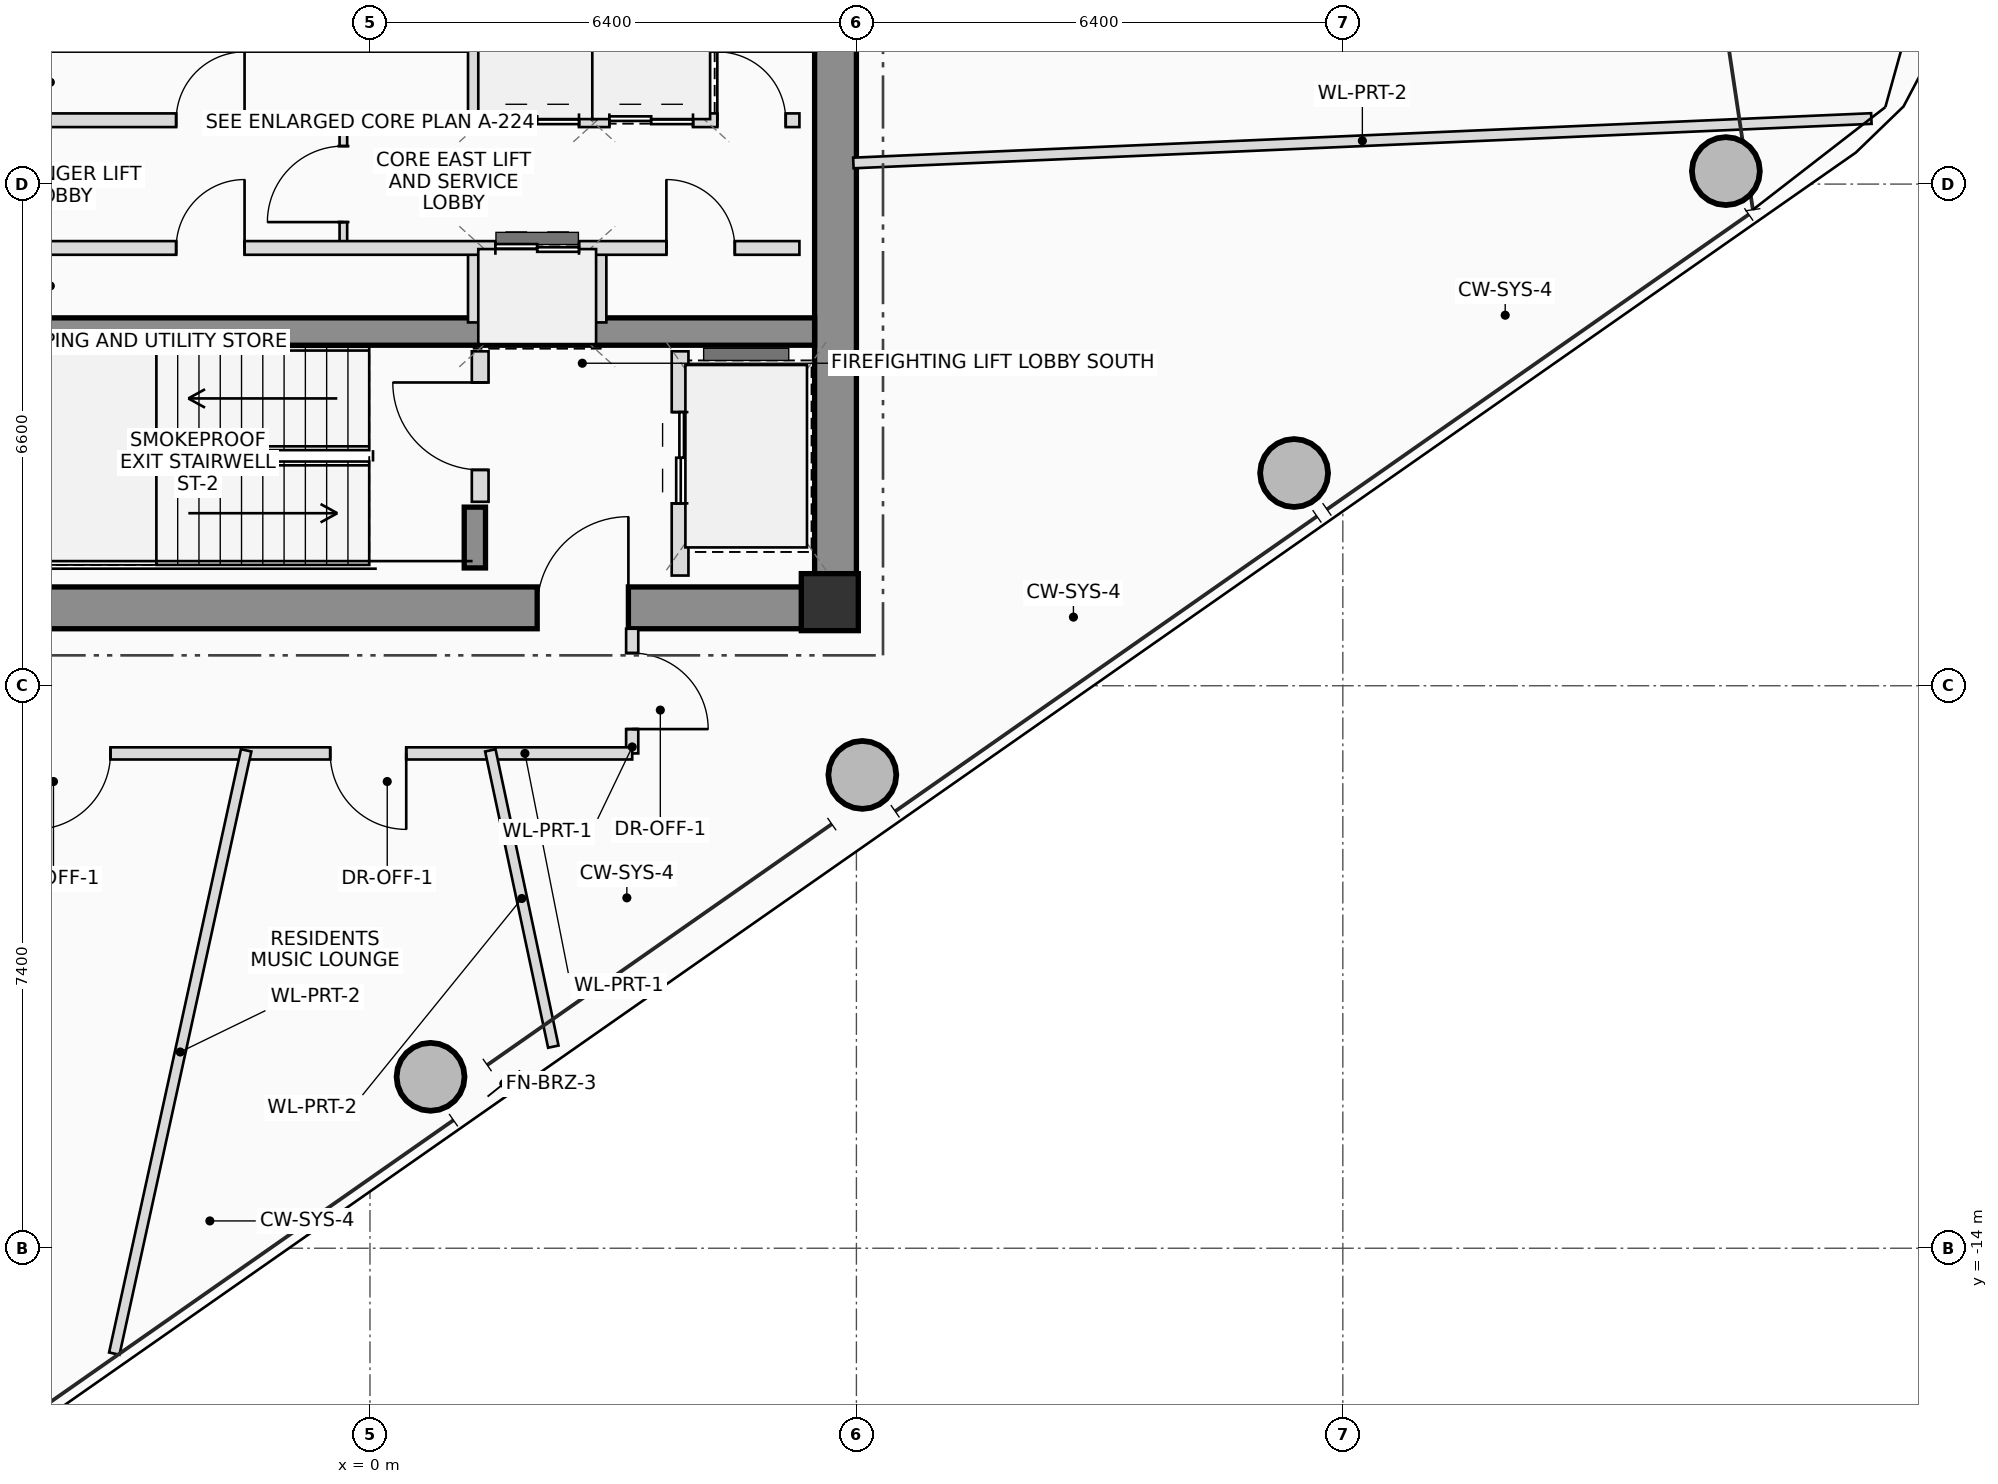
"""IFC4 building model, lengths in metres.
Left out: names, types, materials, properties, quantities, classifications, styles, units other than length and angle.
Written with IfcOpenShell. Run it as: python <this file> out.ifc"""

import sys

from ifc_helpers import new_model, si_unit, direction, frame, frame_2d, origin, origin_2d, place, context, subcontext, project, spatial, rectangle, hollow_circle, extrude, source, transform, mapped, element, fill, save


model = new_model("IFC4")
c1 = context("Model", 3, precision=1e-05, world=origin(), true_north=direction((0.0, 1.0)))
c2 = subcontext(c1, "Body", "Model", "MODEL_VIEW")
j1 = project(units=[si_unit("LENGTHUNIT", "METRE"), si_unit("PLANEANGLEUNIT", "RADIAN")], contexts=[c1])
p1 = place(None, origin())
s1 = spatial("IfcSite", under=j1, at=p1, CompositionType="ELEMENT")
p2 = place(p1, origin())
s2 = spatial("IfcBuilding", under=s1, at=p2, CompositionType="ELEMENT")
p3 = place(p2, frame((0.0, 0.0, 260.95)))
s3 = spatial("IfcBuildingStorey", under=s2, at=p3, CompositionType="ELEMENT", Elevation=260.95)
m1 = source(origin(), c2, "Body", "SweptSolid", [
    extrude(rectangle(XDim=0.75, YDim=0.75, at=origin_2d()), origin(), (0.0, 0.0, 1.0), 3.4),
])
p4 = place(p3, frame((6.05, -5.5, 0.0), z_axis=(0.0, 0.0, 1.0), x_axis=(1.0, 0.0, 0.0)))
e1 = element("IfcColumn", 1, at=p4, inside=s3, PredefinedType="COLUMN", context=c2, shape_type="MappedRepresentation", body=[
    mapped(m1, transform((0.0, 0.0, 0.0), scale=1.0)),
])
p5 = place(p3, frame((-6.4, -5.575, 0.0), z_axis=(0.0, 0.0, 1.0), x_axis=(1.0, 0.0, 0.0)))
e2 = element("IfcWall", 2, at=p5, inside=s3, PredefinedType="SHEAR", context=c2, shape_type="SweptSolid", body=[
    extrude(rectangle(XDim=12.8, YDim=0.55, at=frame_2d((6.4, 0.0))), origin(), (0.0, 0.0, 1.0), 3.4),
])
p6 = place(p5, frame((8.6, 0.0, 0.0)))
e3 = element("IfcOpeningElement", 3, at=p6, cuts=e2, PredefinedType="OPENING", context=c2, shape_type="SweptSolid", body=[
    extrude(rectangle(XDim=1.2, YDim=2.2, at=frame_2d((0.6, 1.1))), frame((0.0, 0.285, 0.0), z_axis=(0.0, -1.0, 0.0), x_axis=(1.0, 0.0, 0.0)), (0.0, 0.0, 1.0), 0.57),
])
p7 = place(p3, frame((6.125, -5.3, 0.0), z_axis=(0.0, 0.0, 1.0), x_axis=(0.0, 1.0, 0.0)))
e4 = element("IfcWall", 4, at=p7, inside=s3, PredefinedType="SHEAR", context=c2, shape_type="SweptSolid", body=[
    extrude(rectangle(XDim=10.6, YDim=0.55, at=frame_2d((5.3, 0.0))), origin(), (0.0, 0.0, 1.0), 3.4),
])
p8 = place(p3, frame((-5.85, -1.94, 0.0), z_axis=(0.0, 0.0, 1.0), x_axis=(1.0, 0.0, 0.0)))
e5 = element("IfcWall", 5, at=p8, inside=s3, PredefinedType="SHEAR", context=c2, shape_type="SweptSolid", body=[
    extrude(rectangle(XDim=11.7, YDim=0.36, at=frame_2d((5.85, 0.0))), origin(), (0.0, 0.0, 1.0), 3.4),
])
p9 = place(p3, frame((1.38, -5.05, 0.0), z_axis=(0.0, 0.0, 1.0), x_axis=(0.0, 1.0, 0.0)))
e6 = element("IfcWall", 6, at=p9, inside=s3, PredefinedType="SHEAR", context=c2, shape_type="SweptSolid", body=[
    extrude(rectangle(XDim=0.8, YDim=0.28, at=frame_2d((0.4, 0.0))), origin(), (0.0, 0.0, 1.0), 3.4),
])
m2 = source(origin(), c2, "Body", "SweptSolid", [
    extrude(hollow_circle(Radius=0.45, WallThickness=0.032, at=origin_2d()), origin(), (0.0, 0.0, 1.0), 3.4),
])
for number, where, z_axis, x_axis in (
    (7, (0.797, -11.745, 0.0), (0.0, 0.0, 1.0), (1.0, 0.0, 0.0)),
    (8, (6.478, -7.773, 0.0), (0.0, 0.0, 1.0), (1.0, 0.0, 0.0)),
    (9, (12.159, -3.801, 0.0), (0.0, 0.0, 1.0), (1.0, 0.0, 0.0)),
    (10, (17.84, 0.171, 0.0), (0.0, 0.0, 1.0), (1.0, 0.0, 0.0)),
):
    element("IfcColumn", number, at=place(p3, frame(where, z_axis=z_axis, x_axis=x_axis)), inside=s3, PredefinedType="COLUMN", context=c2, shape_type="MappedRepresentation", body=[
        mapped(m2, transform((0.0, 0.0, 0.0), scale=1.0)),
    ])
p10 = place(p3, frame((1.45, -4.18, 0.0), z_axis=(0.0, 0.0, 1.0), x_axis=(0.0, 1.0, 0.0)))
e11 = element("IfcWall", 11, at=p10, inside=s3, PredefinedType="PLUMBINGWALL", context=c2, shape_type="SweptSolid", body=[
    extrude(rectangle(XDim=1.98, YDim=0.22, at=frame_2d((0.99, 0.0))), origin(), (0.0, 0.0, 1.0), 3.2),
])
p11 = place(p10, frame((0.42, 0.0, 0.0)))
e12 = element("IfcOpeningElement", 12, at=p11, cuts=e11, PredefinedType="OPENING", context=c2, shape_type="SweptSolid", body=[
    extrude(rectangle(XDim=1.15, YDim=2.15, at=frame_2d((0.575, 1.075))), frame((0.0, 0.12, 0.0), z_axis=(0.0, -1.0, 0.0), x_axis=(1.0, 0.0, 0.0)), (0.0, 0.0, 1.0), 0.24),
])
p12 = place(p3, frame((4.08, -5.15, 0.0), z_axis=(0.0, 0.0, 1.0), x_axis=(0.0, 1.0, 0.0)))
e13 = element("IfcWall", 13, at=p12, inside=s3, PredefinedType="PLUMBINGWALL", context=c2, shape_type="SweptSolid", body=[
    extrude(rectangle(XDim=2.95, YDim=0.22, at=frame_2d((1.475, 0.0))), origin(), (0.0, 0.0, 1.0), 3.2),
])
p13 = place(p12, frame((0.95, 0.0, 0.0)))
e14 = element("IfcOpeningElement", 14, at=p13, cuts=e13, PredefinedType="OPENING", context=c2, shape_type="SweptSolid", body=[
    extrude(rectangle(XDim=1.2, YDim=2.25, at=frame_2d((0.6, 1.125))), frame((0.0, 0.12, 0.0), z_axis=(0.0, -1.0, 0.0), x_axis=(1.0, 0.0, 0.0)), (0.0, 0.0, 1.0), 0.24),
])
p14 = place(p3, frame((-0.35, -0.84, 0.0), z_axis=(0.0, 0.0, 1.0), x_axis=(0.0, 1.0, 0.0)))
e15 = element("IfcWall", 15, at=p14, inside=s3, PredefinedType="PARTITIONING", context=c2, shape_type="SweptSolid", body=[
    extrude(rectangle(XDim=1.68, YDim=0.1, at=frame_2d((0.84, 0.0))), origin(), (0.0, 0.0, 1.0), 3.2),
])
p15 = place(p14, frame((0.34, 0.0, 0.0)))
e16 = element("IfcOpeningElement", 16, at=p15, cuts=e15, PredefinedType="OPENING", context=c2, shape_type="SweptSolid", body=[
    extrude(rectangle(XDim=1.0, YDim=2.25, at=frame_2d((0.5, 1.125))), frame((0.0, 0.06, 0.0), z_axis=(0.0, -1.0, 0.0), x_axis=(1.0, 0.0, 0.0)), (0.0, 0.0, 1.0), 0.12),
])
for number, where, z_axis, x_axis in (
    (17, (1.38, 0.84, 0.0), (0.0, 0.0, 1.0), (0.0, 1.0, 0.0)),
    (18, (1.38, -1.82, 0.0), (0.0, 0.0, 1.0), (0.0, 1.0, 0.0)),
    (19, (3.02, 0.84, 0.0), (0.0, 0.0, 1.0), (0.0, 1.0, 0.0)),
    (20, (4.38, 0.84, 0.0), (0.0, 0.0, 1.0), (0.0, 1.0, 0.0)),
    (21, (3.02, -1.82, 0.0), (0.0, 0.0, 1.0), (0.0, 1.0, 0.0)),
):
    element("IfcWall", number, at=place(p3, frame(where, z_axis=z_axis, x_axis=x_axis)), inside=s3, PredefinedType="PLUMBINGWALL", context=c2, shape_type="SweptSolid", body=[
        extrude(rectangle(XDim=0.98, YDim=0.18, at=frame_2d((0.49, 0.0))), origin(), (0.0, 0.0, 1.0), 3.2),
    ])
p16 = place(p3, frame((-5.68, 0.84, 0.0), z_axis=(0.0, 0.0, 1.0), x_axis=(1.0, 0.0, 0.0)))
e22 = element("IfcWall", 22, at=p16, inside=s3, PredefinedType="PLUMBINGWALL", context=c2, shape_type="SweptSolid", body=[
    extrude(rectangle(XDim=11.33, YDim=0.18, at=frame_2d((5.665, 0.0))), origin(), (0.0, 0.0, 1.0), 3.2),
])
p17 = place(p16, frame((3.13, 0.0, 0.0)))
e23 = element("IfcOpeningElement", 23, at=p17, cuts=e22, PredefinedType="OPENING", context=c2, shape_type="SweptSolid", body=[
    extrude(rectangle(XDim=0.9, YDim=2.05, at=frame_2d((0.45, 1.025))), frame((0.0, 0.1, 0.0), z_axis=(0.0, -1.0, 0.0), x_axis=(1.0, 0.0, 0.0)), (0.0, 0.0, 1.0), 0.2),
])
p18 = place(p16, frame((7.33, 0.0, 0.0)))
e24 = element("IfcOpeningElement", 24, at=p18, cuts=e22, PredefinedType="OPENING", context=c2, shape_type="SweptSolid", body=[
    extrude(rectangle(XDim=1.1, YDim=2.2, at=frame_2d((0.55, 1.1))), frame((0.0, 0.1, 0.0), z_axis=(0.0, -1.0, 0.0), x_axis=(1.0, 0.0, 0.0)), (0.0, 0.0, 1.0), 0.2),
])
p19 = place(p16, frame((8.83, 0.0, 0.0)))
e25 = element("IfcOpeningElement", 25, at=p19, cuts=e22, PredefinedType="OPENING", context=c2, shape_type="SweptSolid", body=[
    extrude(rectangle(XDim=1.1, YDim=2.2, at=frame_2d((0.55, 1.1))), frame((0.0, 0.1, 0.0), z_axis=(0.0, -1.0, 0.0), x_axis=(1.0, 0.0, 0.0)), (0.0, 0.0, 1.0), 0.2),
])
p20 = place(p16, frame((10.25, 0.0, 0.0)))
e26 = element("IfcOpeningElement", 26, at=p20, cuts=e22, PredefinedType="OPENING", context=c2, shape_type="SweptSolid", body=[
    extrude(rectangle(XDim=0.9, YDim=2.05, at=frame_2d((0.45, 1.025))), frame((0.0, 0.1, 0.0), z_axis=(0.0, -1.0, 0.0), x_axis=(1.0, 0.0, 0.0)), (0.0, 0.0, 1.0), 0.2),
])
p21 = place(p3, frame((-5.68, -0.84, 0.0), z_axis=(0.0, 0.0, 1.0), x_axis=(1.0, 0.0, 0.0)))
e27 = element("IfcWall", 27, at=p21, inside=s3, PredefinedType="PLUMBINGWALL", context=c2, shape_type="SweptSolid", body=[
    extrude(rectangle(XDim=11.33, YDim=0.18, at=frame_2d((5.665, 0.0))), origin(), (0.0, 0.0, 1.0), 3.2),
])
p22 = place(p21, frame((3.13, 0.0, 0.0)))
e28 = element("IfcOpeningElement", 28, at=p22, cuts=e27, PredefinedType="OPENING", context=c2, shape_type="SweptSolid", body=[
    extrude(rectangle(XDim=0.9, YDim=2.05, at=frame_2d((0.45, 1.025))), frame((0.0, 0.1, 0.0), z_axis=(0.0, -1.0, 0.0), x_axis=(1.0, 0.0, 0.0)), (0.0, 0.0, 1.0), 0.2),
])
p23 = place(p21, frame((7.33, 0.0, 0.0)))
e29 = element("IfcOpeningElement", 29, at=p23, cuts=e27, PredefinedType="OPENING", context=c2, shape_type="SweptSolid", body=[
    extrude(rectangle(XDim=1.1, YDim=2.2, at=frame_2d((0.55, 1.1))), frame((0.0, 0.1, 0.0), z_axis=(0.0, -1.0, 0.0), x_axis=(1.0, 0.0, 0.0)), (0.0, 0.0, 1.0), 0.2),
])
p24 = place(p21, frame((9.58, 0.0, 0.0)))
e30 = element("IfcOpeningElement", 30, at=p24, cuts=e27, PredefinedType="OPENING", context=c2, shape_type="SweptSolid", body=[
    extrude(rectangle(XDim=0.9, YDim=2.05, at=frame_2d((0.45, 1.025))), frame((0.0, 0.1, 0.0), z_axis=(0.0, -1.0, 0.0), x_axis=(1.0, 0.0, 0.0)), (0.0, 0.0, 1.0), 0.2),
])
p25 = place(p3, frame((3.45, -5.85, 0.0), z_axis=(0.0, 0.0, 1.0), x_axis=(0.0, -1.0, 0.0)))
e31 = element("IfcWall", 31, at=p25, inside=s3, PredefinedType="PARTITIONING", context=c2, shape_type="SweptSolid", body=[
    extrude(rectangle(XDim=1.64, YDim=0.16, at=frame_2d((0.82, 0.0))), origin(), (0.0, 0.0, 1.0), 3.2),
])
p26 = place(p25, frame((0.32, 0.0, 0.0)))
e32 = element("IfcOpeningElement", 32, at=p26, cuts=e31, PredefinedType="OPENING", context=c2, shape_type="SweptSolid", body=[
    extrude(rectangle(XDim=1.0, YDim=2.25, at=frame_2d((0.5, 1.125))), frame((0.0, 0.09, 0.0), z_axis=(0.0, -1.0, 0.0), x_axis=(1.0, 0.0, 0.0)), (0.0, 0.0, 1.0), 0.18),
])
p27 = place(p3, frame((3.45, -7.49, 0.0), z_axis=(0.0, 0.0, 1.0), x_axis=(-1.0, 0.0, 0.0)))
e33 = element("IfcWall", 33, at=p27, inside=s3, PredefinedType="PARTITIONING", context=c2, shape_type="SweptSolid", body=[
    extrude(rectangle(XDim=9.81, YDim=0.16, at=frame_2d((4.905, 0.0))), origin(), (0.0, 0.0, 1.0), 2.605),
])
p28 = place(p27, frame((2.973, 0.0, 0.0)))
e34 = element("IfcOpeningElement", 34, at=p28, cuts=e33, PredefinedType="OPENING", context=c2, shape_type="SweptSolid", body=[
    extrude(rectangle(XDim=1.0, YDim=2.25, at=frame_2d((0.5, 1.125))), frame((0.0, 0.09, 0.0), z_axis=(0.0, -1.0, 0.0), x_axis=(1.0, 0.0, 0.0)), (0.0, 0.0, 1.0), 0.18),
])
p29 = place(p27, frame((6.865, 0.0, 0.0)))
e35 = element("IfcOpeningElement", 35, at=p29, cuts=e33, PredefinedType="OPENING", context=c2, shape_type="SweptSolid", body=[
    extrude(rectangle(XDim=1.0, YDim=2.25, at=frame_2d((0.5, 1.125))), frame((0.0, 0.09, 0.0), z_axis=(0.0, -1.0, 0.0), x_axis=(1.0, 0.0, 0.0)), (0.0, 0.0, 1.0), 0.18),
])
p30 = place(p3, frame((6.36, 0.278, 0.0), z_axis=(0.0, 0.0, 1.0), x_axis=(0.999047617824, 0.043633213494, 0.0)))
e36 = element("IfcWall", 36, at=p30, inside=s3, PredefinedType="PARTITIONING", context=c2, shape_type="SweptSolid", body=[
    extrude(rectangle(XDim=13.406, YDim=0.14, at=frame_2d((6.703, 0.0))), origin(), (0.0, 0.0, 1.0), 2.605),
])
p31 = place(p3, frame((-1.629, -7.45, 0.0), z_axis=(0.0, 0.0, 1.0), x_axis=(-0.213607255038, -0.976919618287, 0.0)))
e37 = element("IfcWall", 37, at=p31, inside=s3, PredefinedType="PARTITIONING", context=c2, shape_type="SweptSolid", body=[
    extrude(rectangle(XDim=8.124, YDim=0.14, at=frame_2d((4.062, 0.0))), origin(), (0.0, 0.0, 1.0), 2.765),
])
p32 = place(p3, frame((1.583, -7.45, 0.0), z_axis=(0.0, 0.0, 1.0), x_axis=(0.207930561362, -0.978143589485, 0.0)))
e38 = element("IfcWall", 38, at=p32, inside=s3, PredefinedType="PARTITIONING", context=c2, shape_type="SweptSolid", body=[
    extrude(rectangle(XDim=3.985, YDim=0.14, at=frame_2d((1.993, 0.0))), origin(), (0.0, 0.0, 1.0), 2.605),
])
p33 = place(p6, origin())
e39 = element("IfcDoor", 39, at=p33, inside=s3, OperationType="SINGLE_SWING_RIGHT", PredefinedType="DOOR", context=c2, shape_type="SweptSolid", body=[
    extrude(rectangle(XDim=1.2, YDim=2.2, at=frame_2d((0.6, 1.1))), frame((0.0, 0.025, 0.0), z_axis=(0.0, -1.0, 0.0), x_axis=(1.0, 0.0, 0.0)), (0.0, 0.0, 1.0), 0.05),
])
fill(e3, e39)
p34 = place(p11, origin())
e40 = element("IfcDoor", 40, at=p34, inside=s3, OperationType="SINGLE_SWING_RIGHT", PredefinedType="DOOR", context=c2, shape_type="SweptSolid", body=[
    extrude(rectangle(XDim=1.15, YDim=2.15, at=frame_2d((0.575, 1.075))), frame((0.0, 0.025, 0.0), z_axis=(0.0, -1.0, 0.0), x_axis=(1.0, 0.0, 0.0)), (0.0, 0.0, 1.0), 0.05),
])
fill(e12, e40)
p35 = place(p13, origin())
e41 = element("IfcDoor", 41, at=p35, inside=s3, OperationType="DOUBLE_DOOR_SLIDING", PredefinedType="DOOR", context=c2, shape_type="SweptSolid", body=[
    extrude(rectangle(XDim=1.2, YDim=2.25, at=frame_2d((0.6, 1.125))), frame((0.0, 0.025, 0.0), z_axis=(0.0, -1.0, 0.0), x_axis=(1.0, 0.0, 0.0)), (0.0, 0.0, 1.0), 0.05),
])
fill(e14, e41)
p36 = place(p15, origin())
e42 = element("IfcDoor", 42, at=p36, inside=s3, OperationType="SINGLE_SWING_LEFT", PredefinedType="DOOR", context=c2, shape_type="SweptSolid", body=[
    extrude(rectangle(XDim=1.0, YDim=2.25, at=frame_2d((0.5, 1.125))), frame((0.0, 0.025, 0.0), z_axis=(0.0, -1.0, 0.0), x_axis=(1.0, 0.0, 0.0)), (0.0, 0.0, 1.0), 0.05),
])
fill(e16, e42)
p37 = place(p17, origin())
e43 = element("IfcDoor", 43, at=p37, inside=s3, OperationType="SINGLE_SWING_RIGHT", PredefinedType="DOOR", context=c2, shape_type="SweptSolid", body=[
    extrude(rectangle(XDim=0.9, YDim=2.05, at=frame_2d((0.45, 1.025))), frame((0.0, 0.025, 0.0), z_axis=(0.0, -1.0, 0.0), x_axis=(1.0, 0.0, 0.0)), (0.0, 0.0, 1.0), 0.05),
])
fill(e23, e43)
p38 = place(p18, origin())
e44 = element("IfcDoor", 44, at=p38, inside=s3, OperationType="DOUBLE_DOOR_SLIDING", PredefinedType="DOOR", context=c2, shape_type="SweptSolid", body=[
    extrude(rectangle(XDim=1.1, YDim=2.2, at=frame_2d((0.55, 1.1))), frame((0.0, 0.025, 0.0), z_axis=(0.0, -1.0, 0.0), x_axis=(1.0, 0.0, 0.0)), (0.0, 0.0, 1.0), 0.05),
])
fill(e24, e44)
p39 = place(p19, origin())
e45 = element("IfcDoor", 45, at=p39, inside=s3, OperationType="DOUBLE_DOOR_SLIDING", PredefinedType="DOOR", context=c2, shape_type="SweptSolid", body=[
    extrude(rectangle(XDim=1.1, YDim=2.2, at=frame_2d((0.55, 1.1))), frame((0.0, 0.025, 0.0), z_axis=(0.0, -1.0, 0.0), x_axis=(1.0, 0.0, 0.0)), (0.0, 0.0, 1.0), 0.05),
])
fill(e25, e45)
p40 = place(p20, origin())
e46 = element("IfcDoor", 46, at=p40, inside=s3, OperationType="SINGLE_SWING_LEFT", PredefinedType="DOOR", context=c2, shape_type="SweptSolid", body=[
    extrude(rectangle(XDim=0.9, YDim=2.05, at=frame_2d((0.45, 1.025))), frame((0.0, 0.025, 0.0), z_axis=(0.0, -1.0, 0.0), x_axis=(1.0, 0.0, 0.0)), (0.0, 0.0, 1.0), 0.05),
])
fill(e26, e46)
p41 = place(p22, origin())
e47 = element("IfcDoor", 47, at=p41, inside=s3, OperationType="SINGLE_SWING_RIGHT", PredefinedType="DOOR", context=c2, shape_type="SweptSolid", body=[
    extrude(rectangle(XDim=0.9, YDim=2.05, at=frame_2d((0.45, 1.025))), frame((0.0, 0.025, 0.0), z_axis=(0.0, -1.0, 0.0), x_axis=(1.0, 0.0, 0.0)), (0.0, 0.0, 1.0), 0.05),
])
fill(e28, e47)
p42 = place(p23, origin())
e48 = element("IfcDoor", 48, at=p42, inside=s3, OperationType="DOUBLE_DOOR_SLIDING", PredefinedType="DOOR", context=c2, shape_type="SweptSolid", body=[
    extrude(rectangle(XDim=1.1, YDim=2.2, at=frame_2d((0.55, 1.1))), frame((0.0, 0.025, 0.0), z_axis=(0.0, -1.0, 0.0), x_axis=(1.0, 0.0, 0.0)), (0.0, 0.0, 1.0), 0.05),
])
fill(e29, e48)
p43 = place(p24, origin())
e49 = element("IfcDoor", 49, at=p43, inside=s3, OperationType="SINGLE_SWING_LEFT", PredefinedType="DOOR", context=c2, shape_type="SweptSolid", body=[
    extrude(rectangle(XDim=0.9, YDim=2.05, at=frame_2d((0.45, 1.025))), frame((0.0, 0.025, 0.0), z_axis=(0.0, -1.0, 0.0), x_axis=(1.0, 0.0, 0.0)), (0.0, 0.0, 1.0), 0.05),
])
fill(e30, e49)
p44 = place(p26, origin())
e50 = element("IfcDoor", 50, at=p44, inside=s3, OperationType="SINGLE_SWING_RIGHT", PredefinedType="DOOR", context=c2, shape_type="SweptSolid", body=[
    extrude(rectangle(XDim=1.0, YDim=2.25, at=frame_2d((0.5, 1.125))), frame((0.0, 0.025, 0.0), z_axis=(0.0, -1.0, 0.0), x_axis=(1.0, 0.0, 0.0)), (0.0, 0.0, 1.0), 0.05),
])
fill(e32, e50)
p45 = place(p28, origin())
e51 = element("IfcDoor", 51, at=p45, inside=s3, OperationType="SINGLE_SWING_LEFT", PredefinedType="DOOR", context=c2, shape_type="SweptSolid", body=[
    extrude(rectangle(XDim=1.0, YDim=2.25, at=frame_2d((0.5, 1.125))), frame((0.0, 0.025, 0.0), z_axis=(0.0, -1.0, 0.0), x_axis=(1.0, 0.0, 0.0)), (0.0, 0.0, 1.0), 0.05),
])
fill(e34, e51)
p46 = place(p29, origin())
e52 = element("IfcDoor", 52, at=p46, inside=s3, OperationType="SINGLE_SWING_RIGHT", PredefinedType="DOOR", context=c2, shape_type="SweptSolid", body=[
    extrude(rectangle(XDim=1.0, YDim=2.25, at=frame_2d((0.5, 1.125))), frame((0.0, 0.025, 0.0), z_axis=(0.0, -1.0, 0.0), x_axis=(1.0, 0.0, 0.0)), (0.0, 0.0, 1.0), 0.05),
])
fill(e35, e52)
save(model, sys.argv[1])
